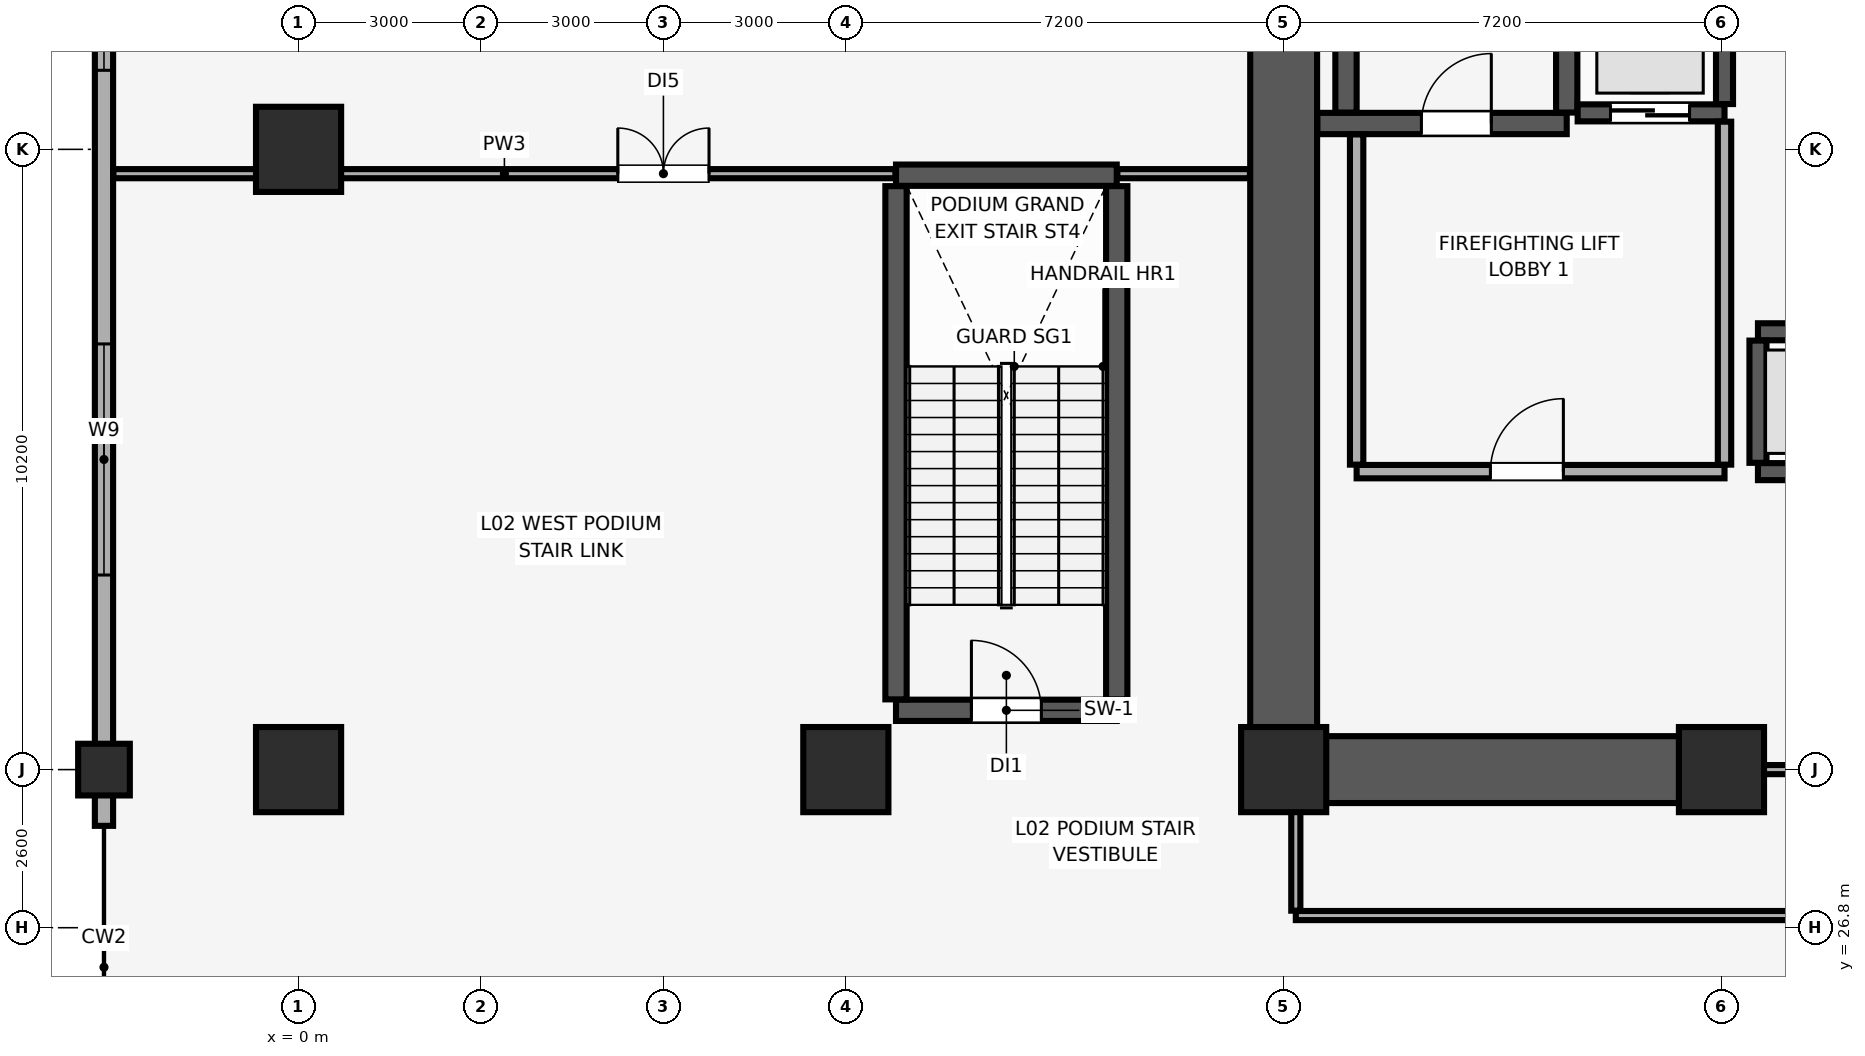
"""IFC4 building model, lengths in metres.
Left out: names, types, materials, properties, quantities, classifications, styles, units other than length and angle.
Written with IfcOpenShell. Run it as: python <this file> out.ifc"""

import sys

from ifc_helpers import new_model, si_unit, direction, frame, frame_2d, origin, origin_2d, place, context, subcontext, project, spatial, rectangle, extrude, element, fill, save


model = new_model("IFC4")
c1 = context("Model", 3, precision=1e-05, world=origin(), true_north=direction((0.0, 1.0)))
c2 = subcontext(c1, "Body", "Model", "MODEL_VIEW")
j1 = project(units=[si_unit("LENGTHUNIT", "METRE"), si_unit("PLANEANGLEUNIT", "RADIAN")], contexts=[c1])
p1 = place(None, origin())
s1 = spatial("IfcSite", under=j1, at=p1, CompositionType="ELEMENT")
p2 = place(p1, origin())
s2 = spatial("IfcBuilding", under=s1, at=p2, CompositionType="ELEMENT")
p3 = place(p2, frame((0.0, 0.0, 14.0)))
s3 = spatial("IfcBuildingStorey", under=s2, at=p3, CompositionType="ELEMENT", Elevation=14.0)
p4 = place(p3, frame((-3.2, 29.4, 0.0), z_axis=(0.0, 0.0, 1.0), x_axis=(1.0, 0.0, 0.0)))
e1 = element("IfcColumn", 1, at=p4, inside=s3, PredefinedType="COLUMN", context=c2, shape_type="SweptSolid", body=[
    extrude(rectangle(XDim=0.85, YDim=0.85, at=origin_2d()), origin(), (0.0, 0.0, 1.0), 5.08),
])
for number, where, z_axis, x_axis in (
    (2, (9.0, 29.4, 0.0), (0.0, 0.0, 1.0), (1.0, 0.0, 0.0)),
    (3, (16.2, 29.4, 0.0), (0.0, 0.0, 1.0), (1.0, 0.0, 0.0)),
    (4, (23.4, 29.4, 0.0), (0.0, 0.0, 1.0), (1.0, 0.0, 0.0)),
    (5, (0.0, 29.4, 0.0), (0.0, 0.0, 1.0), (1.0, 0.0, 0.0)),
    (6, (0.0, 39.6, 0.0), (0.0, 0.0, 1.0), (1.0, 0.0, 0.0)),
):
    element("IfcColumn", number, at=place(p3, frame(where, z_axis=z_axis, x_axis=x_axis)), inside=s3, PredefinedType="COLUMN", context=c2, shape_type="SweptSolid", body=[
        extrude(rectangle(XDim=1.4, YDim=1.4, at=origin_2d()), origin(), (0.0, 0.0, 1.0), 5.08),
    ])
p5 = place(p3, frame((-3.2, 48.9, 0.0), z_axis=(0.0, 0.0, 1.0), x_axis=(0.0, -1.0, 0.0)))
e7 = element("IfcWall", 7, at=p5, inside=s3, PredefinedType="SOLIDWALL", context=c2, shape_type="SweptSolid", body=[
    extrude(rectangle(XDim=20.425, YDim=0.3, at=frame_2d((10.212, 0.0))), origin(), (0.0, 0.0, 1.0), 4.13),
])
p6 = place(p5, frame((12.5, 0.0, 0.85)))
e8 = element("IfcOpeningElement", 8, at=p6, cuts=e7, PredefinedType="OPENING", context=c2, shape_type="SweptSolid", body=[
    extrude(rectangle(XDim=3.8, YDim=2.2, at=frame_2d((1.9, 1.1))), frame((0.0, 0.16, 0.0), z_axis=(0.0, -1.0, 0.0), x_axis=(1.0, 0.0, 0.0)), (0.0, 0.0, 1.0), 0.32),
])
p7 = place(p5, frame((4.2, 0.0, 0.85)))
e9 = element("IfcOpeningElement", 9, at=p7, cuts=e7, PredefinedType="OPENING", context=c2, shape_type="SweptSolid", body=[
    extrude(rectangle(XDim=3.8, YDim=2.2, at=frame_2d((1.9, 1.1))), frame((0.0, 0.16, 0.0), z_axis=(0.0, -1.0, 0.0), x_axis=(1.0, 0.0, 0.0)), (0.0, 0.0, 1.0), 0.32),
])
p8 = place(p3, frame((16.2, 29.4, 0.0), z_axis=(0.0, 0.0, 1.0), x_axis=(0.0, 1.0, 0.0)))
e10 = element("IfcWall", 10, at=p8, inside=s3, PredefinedType="SHEAR", context=c2, shape_type="SweptSolid", body=[
    extrude(rectangle(XDim=19.2, YDim=1.1, at=frame_2d((9.6, 0.0))), origin(), (0.0, 0.0, 1.0), 5.08),
])
p9 = place(p3, frame((16.755, 29.4, 0.0), z_axis=(0.0, 0.0, 1.0), x_axis=(1.0, 0.0, 0.0)))
e11 = element("IfcWall", 11, at=p9, inside=s3, PredefinedType="SHEAR", context=c2, shape_type="SweptSolid", body=[
    extrude(rectangle(XDim=6.845, YDim=1.1, at=frame_2d((3.423, 0.0))), origin(), (0.0, 0.0, 1.0), 5.08),
])
p10 = place(p3, frame((16.755, 40.025, 0.0), z_axis=(0.0, 0.0, 1.0), x_axis=(1.0, 0.0, 0.0)))
e12 = element("IfcWall", 12, at=p10, inside=s3, PredefinedType="SHEAR", context=c2, shape_type="SweptSolid", body=[
    extrude(rectangle(XDim=4.1, YDim=0.35, at=frame_2d((2.05, 0.0))), origin(), (0.0, 0.0, 1.0), 5.08),
])
p11 = place(p10, frame((1.71, 0.0, 0.0)))
e13 = element("IfcOpeningElement", 13, at=p11, cuts=e12, PredefinedType="OPENING", context=c2, shape_type="SweptSolid", body=[
    extrude(rectangle(XDim=1.15, YDim=2.15, at=frame_2d((0.575, 1.075))), frame((0.0, 0.185, 0.0), z_axis=(0.0, -1.0, 0.0), x_axis=(1.0, 0.0, 0.0)), (0.0, 0.0, 1.0), 0.37),
])
for number, where, z_axis, x_axis in (
    (14, (17.225, 40.205, 0.0), (0.0, 0.0, 1.0), (0.0, 1.0, 0.0)),
    (15, (20.855, 40.205, 0.0), (0.0, 0.0, 1.0), (0.0, 1.0, 0.0)),
):
    element("IfcWall", number, at=place(p3, frame(where, z_axis=z_axis, x_axis=x_axis)), inside=s3, PredefinedType="SHEAR", context=c2, shape_type="SweptSolid", body=[
        extrude(rectangle(XDim=8.09, YDim=0.35, at=frame_2d((4.045, 0.0))), origin(), (0.0, 0.0, 1.0), 5.08),
    ])
p12 = place(p3, frame((9.825, 30.375, 0.0), z_axis=(0.0, 0.0, 1.0), x_axis=(1.0, 0.0, 0.0)))
e16 = element("IfcWall", 16, at=p12, inside=s3, PredefinedType="SHEAR", context=c2, shape_type="SweptSolid", body=[
    extrude(rectangle(XDim=3.63, YDim=0.35, at=frame_2d((1.815, 0.0))), origin(), (0.0, 0.0, 1.0), 5.08),
])
p13 = place(p12, frame((1.24, 0.0, 0.0)))
e17 = element("IfcOpeningElement", 17, at=p13, cuts=e16, PredefinedType="OPENING", context=c2, shape_type="SweptSolid", body=[
    extrude(rectangle(XDim=1.15, YDim=2.15, at=frame_2d((0.575, 1.075))), frame((0.0, 0.185, 0.0), z_axis=(0.0, -1.0, 0.0), x_axis=(1.0, 0.0, 0.0)), (0.0, 0.0, 1.0), 0.37),
])
p14 = place(p3, frame((9.825, 39.175, 0.0), z_axis=(0.0, 0.0, 1.0), x_axis=(1.0, 0.0, 0.0)))
e18 = element("IfcWall", 18, at=p14, inside=s3, PredefinedType="SHEAR", context=c2, shape_type="SweptSolid", body=[
    extrude(rectangle(XDim=3.63, YDim=0.35, at=frame_2d((1.815, 0.0))), origin(), (0.0, 0.0, 1.0), 5.08),
])
for number, where, z_axis, x_axis in (
    (19, (9.825, 30.555, 0.0), (0.0, 0.0, 1.0), (0.0, 1.0, 0.0)),
    (20, (13.455, 30.555, 0.0), (0.0, 0.0, 1.0), (0.0, 1.0, 0.0)),
):
    element("IfcWall", number, at=place(p3, frame(where, z_axis=z_axis, x_axis=x_axis)), inside=s3, PredefinedType="SHEAR", context=c2, shape_type="SweptSolid", body=[
        extrude(rectangle(XDim=8.44, YDim=0.35, at=frame_2d((4.22, 0.0))), origin(), (0.0, 0.0, 1.0), 5.08),
    ])
p15 = place(p3, frame((24.0, 34.3, 0.0), z_axis=(0.0, 0.0, 1.0), x_axis=(1.0, 0.0, 0.0)))
e21 = element("IfcWall", 21, at=p15, inside=s3, PredefinedType="SHEAR", context=c2, shape_type="SweptSolid", body=[
    extrude(rectangle(XDim=2.3, YDim=0.28, at=frame_2d((1.15, 0.0))), origin(), (0.0, 0.0, 1.0), 5.08),
])
p16 = place(p15, frame((0.6, 0.0, 0.0)))
e22 = element("IfcOpeningElement", 22, at=p16, cuts=e21, PredefinedType="OPENING", context=c2, shape_type="SweptSolid", body=[
    extrude(rectangle(XDim=1.1, YDim=2.2, at=frame_2d((0.55, 1.1))), frame((0.0, 0.15, 0.0), z_axis=(0.0, -1.0, 0.0), x_axis=(1.0, 0.0, 0.0)), (0.0, 0.0, 1.0), 0.3),
])
p17 = place(p3, frame((24.0, 36.6, 0.0), z_axis=(0.0, 0.0, 1.0), x_axis=(1.0, 0.0, 0.0)))
e23 = element("IfcWall", 23, at=p17, inside=s3, PredefinedType="SHEAR", context=c2, shape_type="SweptSolid", body=[
    extrude(rectangle(XDim=2.3, YDim=0.28, at=frame_2d((1.15, 0.0))), origin(), (0.0, 0.0, 1.0), 5.08),
])
p18 = place(p3, frame((24.0, 34.445, 0.0), z_axis=(0.0, 0.0, 1.0), x_axis=(0.0, 1.0, 0.0)))
e24 = element("IfcWall", 24, at=p18, inside=s3, PredefinedType="SHEAR", context=c2, shape_type="SweptSolid", body=[
    extrude(rectangle(XDim=2.01, YDim=0.28, at=frame_2d((1.005, 0.0))), origin(), (0.0, 0.0, 1.0), 5.08),
])
p19 = place(p3, frame((21.035, 40.2, 0.0), z_axis=(0.0, 0.0, 1.0), x_axis=(1.0, 0.0, 0.0)))
e25 = element("IfcWall", 25, at=p19, inside=s3, PredefinedType="SHEAR", context=c2, shape_type="SweptSolid", body=[
    extrude(rectangle(XDim=2.415, YDim=0.28, at=frame_2d((1.208, 0.0))), origin(), (0.0, 0.0, 1.0), 5.08),
])
p20 = place(p19, frame((0.54, 0.0, 0.0)))
e26 = element("IfcOpeningElement", 26, at=p20, cuts=e25, PredefinedType="OPENING", context=c2, shape_type="SweptSolid", body=[
    extrude(rectangle(XDim=1.3, YDim=2.3, at=frame_2d((0.65, 1.15))), frame((0.0, 0.15, 0.0), z_axis=(0.0, -1.0, 0.0), x_axis=(1.0, 0.0, 0.0)), (0.0, 0.0, 1.0), 0.3),
])
p21 = place(p3, frame((23.45, 40.345, 0.0), z_axis=(0.0, 0.0, 1.0), x_axis=(0.0, 1.0, 0.0)))
e27 = element("IfcWall", 27, at=p21, inside=s3, PredefinedType="SHEAR", context=c2, shape_type="SweptSolid", body=[
    extrude(rectangle(XDim=2.81, YDim=0.28, at=frame_2d((1.405, 0.0))), origin(), (0.0, 0.0, 1.0), 5.08),
])
p22 = place(p3, frame((17.4, 34.3, 0.0), z_axis=(0.0, 0.0, 1.0), x_axis=(1.0, 0.0, 0.0)))
e28 = element("IfcWall", 28, at=p22, inside=s3, PredefinedType="PARTITIONING", context=c2, shape_type="SweptSolid", body=[
    extrude(rectangle(XDim=6.05, YDim=0.22, at=frame_2d((3.025, 0.0))), origin(), (0.0, 0.0, 1.0), 5.08),
])
p23 = place(p22, frame((2.2, 0.0, 0.0)))
e29 = element("IfcOpeningElement", 29, at=p23, cuts=e28, PredefinedType="OPENING", context=c2, shape_type="SweptSolid", body=[
    extrude(rectangle(XDim=1.2, YDim=2.15, at=frame_2d((0.6, 1.075))), frame((0.0, 0.12, 0.0), z_axis=(0.0, -1.0, 0.0), x_axis=(1.0, 0.0, 0.0)), (0.0, 0.0, 1.0), 0.24),
])
p24 = place(p3, frame((17.4, 34.415, 0.0), z_axis=(0.0, 0.0, 1.0), x_axis=(0.0, 1.0, 0.0)))
e30 = element("IfcWall", 30, at=p24, inside=s3, PredefinedType="PARTITIONING", context=c2, shape_type="SweptSolid", body=[
    extrude(rectangle(XDim=5.43, YDim=0.22, at=frame_2d((2.715, 0.0))), origin(), (0.0, 0.0, 1.0), 5.08),
])
p25 = place(p3, frame((23.45, 34.415, 0.0), z_axis=(0.0, 0.0, 1.0), x_axis=(0.0, 1.0, 0.0)))
e31 = element("IfcWall", 31, at=p25, inside=s3, PredefinedType="PARTITIONING", context=c2, shape_type="SweptSolid", body=[
    extrude(rectangle(XDim=5.64, YDim=0.22, at=frame_2d((2.82, 0.0))), origin(), (0.0, 0.0, 1.0), 5.08),
])
p26 = place(p3, frame((-3.045, 39.2, 0.0), z_axis=(0.0, 0.0, 1.0), x_axis=(1.0, 0.0, 0.0)))
e32 = element("IfcWall", 32, at=p26, inside=s3, PredefinedType="PARTITIONING", context=c2, shape_type="SweptSolid", body=[
    extrude(rectangle(XDim=12.86, YDim=0.15, at=frame_2d((6.43, 0.0))), origin(), (0.0, 0.0, 1.0), 5.08),
])
p27 = place(p26, frame((8.295, 0.0, 0.0)))
e33 = element("IfcOpeningElement", 33, at=p27, cuts=e32, PredefinedType="OPENING", context=c2, shape_type="SweptSolid", body=[
    extrude(rectangle(XDim=1.5, YDim=2.25, at=frame_2d((0.75, 1.125))), frame((0.0, 0.085, 0.0), z_axis=(0.0, -1.0, 0.0), x_axis=(1.0, 0.0, 0.0)), (0.0, 0.0, 1.0), 0.17),
])
p28 = place(p3, frame((13.465, 39.2, 0.0), z_axis=(0.0, 0.0, 1.0), x_axis=(1.0, 0.0, 0.0)))
e34 = element("IfcWall", 34, at=p28, inside=s3, PredefinedType="PARTITIONING", context=c2, shape_type="SweptSolid", body=[
    extrude(rectangle(XDim=2.18, YDim=0.15, at=frame_2d((1.09, 0.0))), origin(), (0.0, 0.0, 1.0), 5.08),
])
p29 = place(p3, frame((16.4, 27.0, 0.0), z_axis=(0.0, 0.0, 1.0), x_axis=(1.0, 0.0, 0.0)))
e35 = element("IfcWall", 35, at=p29, inside=s3, PredefinedType="PARTITIONING", context=c2, shape_type="SweptSolid", body=[
    extrude(rectangle(XDim=23.6, YDim=0.15, at=frame_2d((11.8, 0.0))), origin(), (0.0, 0.0, 1.0), 5.08),
])
p30 = place(p29, frame((10.1, 0.0, 0.0)))
e36 = element("IfcOpeningElement", 36, at=p30, cuts=e35, PredefinedType="OPENING", context=c2, shape_type="SweptSolid", body=[
    extrude(rectangle(XDim=1.0, YDim=2.15, at=frame_2d((0.5, 1.075))), frame((0.0, 0.085, 0.0), z_axis=(0.0, -1.0, 0.0), x_axis=(1.0, 0.0, 0.0)), (0.0, 0.0, 1.0), 0.17),
])
p31 = place(p3, frame((23.61, 29.4, 0.0), z_axis=(0.0, 0.0, 1.0), x_axis=(1.0, 0.0, 0.0)))
e37 = element("IfcWall", 37, at=p31, inside=s3, PredefinedType="PARTITIONING", context=c2, shape_type="SweptSolid", body=[
    extrude(rectangle(XDim=6.78, YDim=0.15, at=frame_2d((3.39, 0.0))), origin(), (0.0, 0.0, 1.0), 3.98),
])
p32 = place(p3, frame((16.4, 27.08, 0.0), z_axis=(0.0, 0.0, 1.0), x_axis=(0.0, 1.0, 0.0)))
e38 = element("IfcWall", 38, at=p32, inside=s3, PredefinedType="PARTITIONING", context=c2, shape_type="SweptSolid", body=[
    extrude(rectangle(XDim=2.31, YDim=0.15, at=frame_2d((1.155, 0.0))), origin(), (0.0, 0.0, 1.0), 4.48),
])
p33 = place(p6, origin())
e39 = element("IfcWindow", 39, at=p33, inside=s3, PartitioningType="SINGLE_PANEL", PredefinedType="WINDOW", context=c2, shape_type="SweptSolid", body=[
    extrude(rectangle(XDim=3.8, YDim=2.2, at=frame_2d((1.9, 1.1))), frame((0.0, 0.03, 0.0), z_axis=(0.0, -1.0, 0.0), x_axis=(1.0, 0.0, 0.0)), (0.0, 0.0, 1.0), 0.06),
])
fill(e8, e39)
p34 = place(p7, origin())
e40 = element("IfcWindow", 40, at=p34, inside=s3, PartitioningType="SINGLE_PANEL", PredefinedType="WINDOW", context=c2, shape_type="SweptSolid", body=[
    extrude(rectangle(XDim=3.8, YDim=2.2, at=frame_2d((1.9, 1.1))), frame((0.0, 0.03, 0.0), z_axis=(0.0, -1.0, 0.0), x_axis=(1.0, 0.0, 0.0)), (0.0, 0.0, 1.0), 0.06),
])
fill(e9, e40)
p35 = place(p11, origin())
e41 = element("IfcDoor", 41, at=p35, inside=s3, OperationType="SINGLE_SWING_RIGHT", PredefinedType="DOOR", context=c2, shape_type="SweptSolid", body=[
    extrude(rectangle(XDim=1.15, YDim=2.15, at=frame_2d((0.575, 1.075))), frame((0.0, 0.025, 0.0), z_axis=(0.0, -1.0, 0.0), x_axis=(1.0, 0.0, 0.0)), (0.0, 0.0, 1.0), 0.05),
])
fill(e13, e41)
p36 = place(p13, origin())
e42 = element("IfcDoor", 42, at=p36, inside=s3, OperationType="SINGLE_SWING_LEFT", PredefinedType="DOOR", context=c2, shape_type="SweptSolid", body=[
    extrude(rectangle(XDim=1.15, YDim=2.15, at=frame_2d((0.575, 1.075))), frame((0.0, 0.025, 0.0), z_axis=(0.0, -1.0, 0.0), x_axis=(1.0, 0.0, 0.0)), (0.0, 0.0, 1.0), 0.05),
])
fill(e17, e42)
p37 = place(p20, origin())
e43 = element("IfcDoor", 43, at=p37, inside=s3, OperationType="DOUBLE_DOOR_SLIDING", PredefinedType="DOOR", context=c2, shape_type="SweptSolid", body=[
    extrude(rectangle(XDim=1.3, YDim=2.3, at=frame_2d((0.65, 1.15))), frame((0.0, 0.025, 0.0), z_axis=(0.0, -1.0, 0.0), x_axis=(1.0, 0.0, 0.0)), (0.0, 0.0, 1.0), 0.05),
])
fill(e26, e43)
p38 = place(p23, origin())
e44 = element("IfcDoor", 44, at=p38, inside=s3, OperationType="SINGLE_SWING_RIGHT", PredefinedType="DOOR", context=c2, shape_type="SweptSolid", body=[
    extrude(rectangle(XDim=1.2, YDim=2.15, at=frame_2d((0.6, 1.075))), frame((0.0, 0.025, 0.0), z_axis=(0.0, -1.0, 0.0), x_axis=(1.0, 0.0, 0.0)), (0.0, 0.0, 1.0), 0.05),
])
fill(e29, e44)
p39 = place(p27, origin())
e45 = element("IfcDoor", 45, at=p39, inside=s3, OperationType="DOUBLE_DOOR_SINGLE_SWING", PredefinedType="DOOR", context=c2, shape_type="SweptSolid", body=[
    extrude(rectangle(XDim=1.5, YDim=2.25, at=frame_2d((0.75, 1.125))), frame((0.0, 0.025, 0.0), z_axis=(0.0, -1.0, 0.0), x_axis=(1.0, 0.0, 0.0)), (0.0, 0.0, 1.0), 0.05),
])
fill(e33, e45)
save(model, sys.argv[1])
